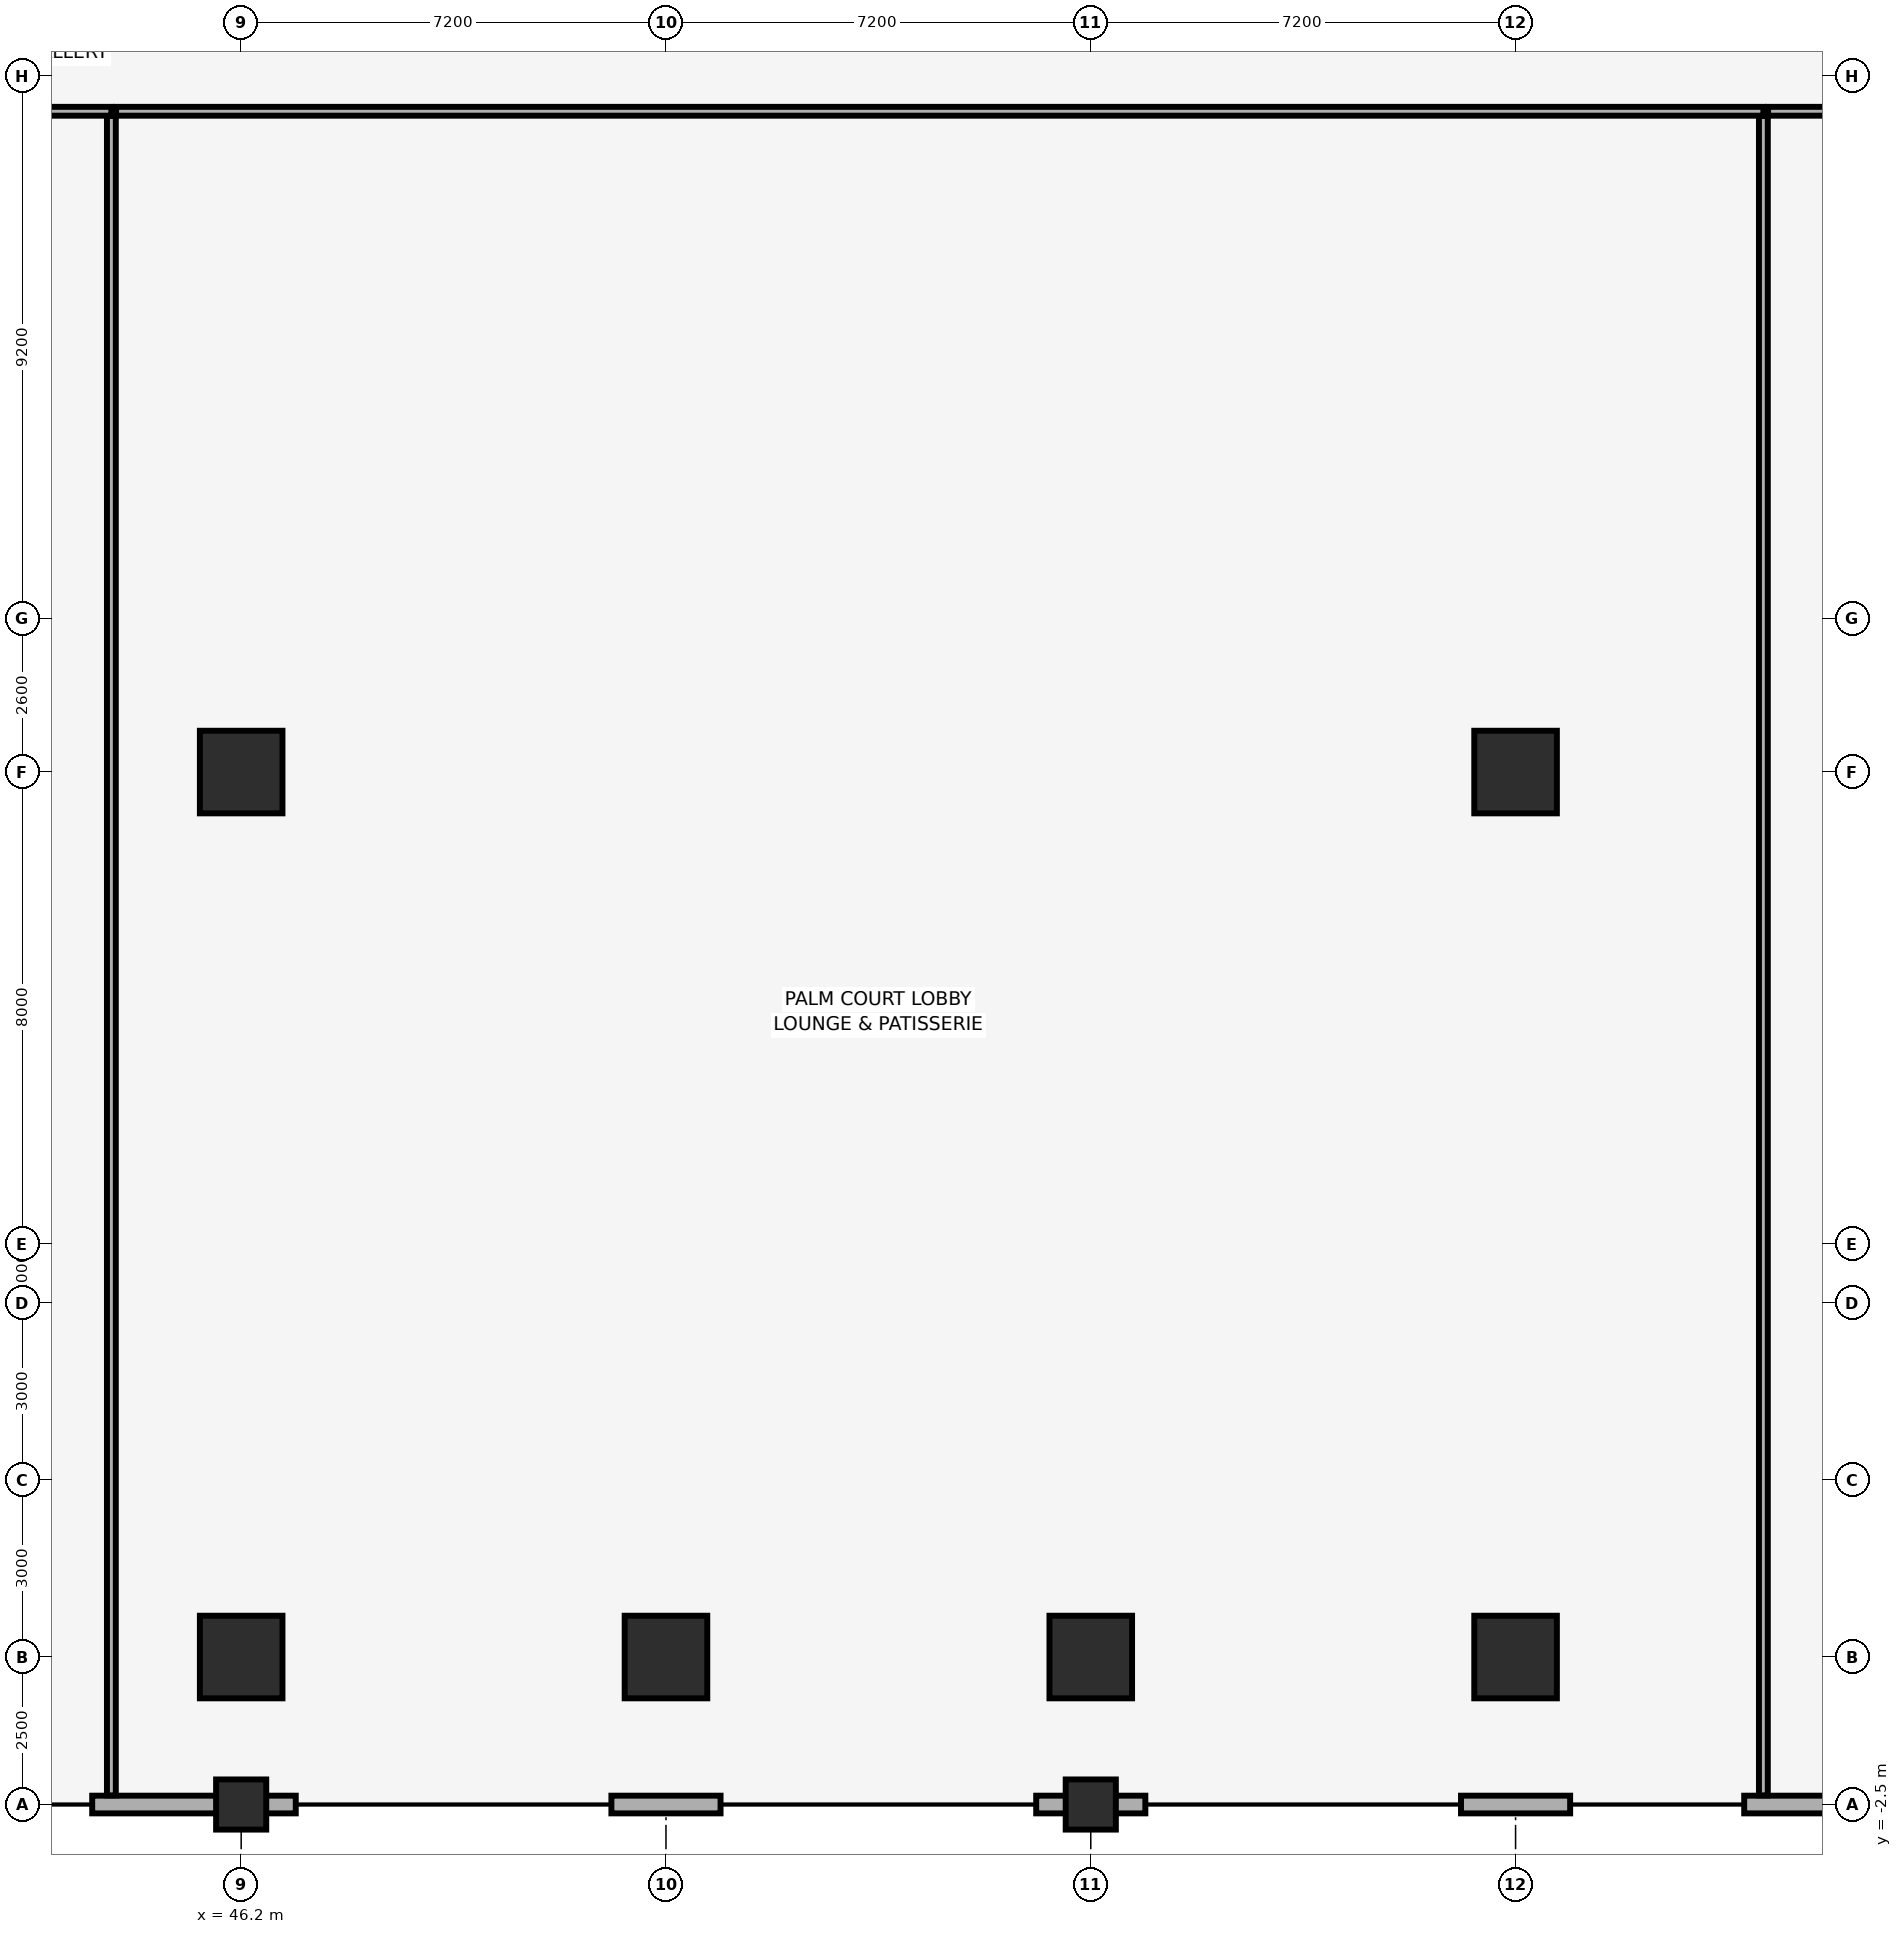
"""IFC4 building model, lengths in metres.
Left out: names, types, materials, properties, quantities, classifications, styles, units other than length and angle.
Written with IfcOpenShell. Run it as: python <this file> out.ifc"""

import sys

from ifc_helpers import new_model, si_unit, direction, frame, frame_2d, origin, origin_2d, place, context, subcontext, project, spatial, rectangle, extrude, element, fill, save


model = new_model("IFC4")
c1 = context("Model", 3, precision=1e-05, world=origin(), true_north=direction((0.0, 1.0)))
c2 = subcontext(c1, "Body", "Model", "MODEL_VIEW")
j1 = project(units=[si_unit("LENGTHUNIT", "METRE"), si_unit("PLANEANGLEUNIT", "RADIAN")], contexts=[c1])
p1 = place(None, origin())
s1 = spatial("IfcSite", under=j1, at=p1, CompositionType="ELEMENT")
p2 = place(p1, origin())
s2 = spatial("IfcBuilding", under=s1, at=p2, CompositionType="ELEMENT")
p3 = place(p2, frame((0.0, 0.0, 8.0)))
s3 = spatial("IfcBuildingStorey", under=s2, at=p3, CompositionType="ELEMENT", Elevation=8.0)
for number, where, z_axis, x_axis in (
    (1, (46.2, -2.5, 0.0), (0.0, 0.0, 1.0), (1.0, 0.0, 0.0)),
    (2, (60.6, -2.5, 0.0), (0.0, 0.0, 1.0), (1.0, 0.0, 0.0)),
):
    element("IfcColumn", number, at=place(p3, frame(where, z_axis=z_axis, x_axis=x_axis)), inside=s3, PredefinedType="COLUMN", context=c2, shape_type="SweptSolid", body=[
        extrude(rectangle(XDim=0.85, YDim=0.85, at=origin_2d()), origin(), (0.0, 0.0, 1.0), 5.68),
    ])
for number, where, z_axis, x_axis in (
    (3, (46.2, 0.0, 0.0), (0.0, 0.0, 1.0), (1.0, 0.0, 0.0)),
    (4, (53.4, 0.0, 0.0), (0.0, 0.0, 1.0), (1.0, 0.0, 0.0)),
    (5, (60.6, 0.0, 0.0), (0.0, 0.0, 1.0), (1.0, 0.0, 0.0)),
    (6, (67.8, 0.0, 0.0), (0.0, 0.0, 1.0), (1.0, 0.0, 0.0)),
    (7, (46.2, 15.0, 0.0), (0.0, 0.0, 1.0), (1.0, 0.0, 0.0)),
    (8, (67.8, 15.0, 0.0), (0.0, 0.0, 1.0), (1.0, 0.0, 0.0)),
):
    element("IfcColumn", number, at=place(p3, frame(where, z_axis=z_axis, x_axis=x_axis)), inside=s3, PredefinedType="COLUMN", context=c2, shape_type="SweptSolid", body=[
        extrude(rectangle(XDim=1.4, YDim=1.4, at=origin_2d()), origin(), (0.0, 0.0, 1.0), 5.68),
    ])
p4 = place(p3, frame((43.675, -2.5, 0.0), z_axis=(0.0, 0.0, 1.0), x_axis=(1.0, 0.0, 0.0)))
e9 = element("IfcWall", 9, at=p4, inside=s3, PredefinedType="SOLIDWALL", context=c2, shape_type="SweptSolid", body=[
    extrude(rectangle(XDim=3.45, YDim=0.3, at=frame_2d((1.725, 0.0))), origin(), (0.0, 0.0, 1.0), 4.73),
])
for number, where, z_axis, x_axis in (
    (10, (52.475, -2.5, 0.0), (0.0, 0.0, 1.0), (1.0, 0.0, 0.0)),
    (11, (59.675, -2.5, 0.0), (0.0, 0.0, 1.0), (1.0, 0.0, 0.0)),
):
    element("IfcWall", number, at=place(p3, frame(where, z_axis=z_axis, x_axis=x_axis)), inside=s3, PredefinedType="SOLIDWALL", context=c2, shape_type="SweptSolid", body=[
        extrude(rectangle(XDim=1.85, YDim=0.3, at=frame_2d((0.925, 0.0))), origin(), (0.0, 0.0, 1.0), 4.73),
    ])
p5 = place(p3, frame((66.875, -2.5, 0.0), z_axis=(0.0, 0.0, 1.0), x_axis=(1.0, 0.0, 0.0)))
e12 = element("IfcWall", 12, at=p5, inside=s3, PredefinedType="SOLIDWALL", context=c2, shape_type="SweptSolid", body=[
    extrude(rectangle(XDim=1.85, YDim=0.3, at=frame_2d((0.925, 0.0))), origin(), (0.0, 0.0, 1.0), 4.73),
])
p6 = place(p3, frame((71.675, -2.5, 0.0), z_axis=(0.0, 0.0, 1.0), x_axis=(1.0, 0.0, 0.0)))
e13 = element("IfcWall", 13, at=p6, inside=s3, PredefinedType="SOLIDWALL", context=c2, shape_type="SweptSolid", body=[
    extrude(rectangle(XDim=11.925, YDim=0.3, at=frame_2d((5.962, 0.0))), origin(), (0.0, 0.0, 1.0), 4.73),
])
p7 = place(p6, frame((5.05, 0.0, 0.85)))
e14 = element("IfcOpeningElement", 14, at=p7, cuts=e13, PredefinedType="OPENING", context=c2, shape_type="SweptSolid", body=[
    extrude(rectangle(XDim=5.4, YDim=2.4, at=frame_2d((2.7, 1.2))), frame((0.0, 0.16, 0.0), z_axis=(0.0, -1.0, 0.0), x_axis=(1.0, 0.0, 0.0)), (0.0, 0.0, 1.0), 0.32),
])
p8 = place(p3, frame((9.0, 26.2, 0.0), z_axis=(0.0, 0.0, 1.0), x_axis=(1.0, 0.0, 0.0)))
e15 = element("IfcWall", 15, at=p8, inside=s3, PredefinedType="PARTITIONING", context=c2, shape_type="SweptSolid", body=[
    extrude(rectangle(XDim=35.0, YDim=0.15, at=frame_2d((17.5, 0.0))), origin(), (0.0, 0.0, 1.0), 5.68),
])
p9 = place(p8, frame((17.25, 0.0, 0.0)))
e16 = element("IfcOpeningElement", 16, at=p9, cuts=e15, PredefinedType="OPENING", context=c2, shape_type="SweptSolid", body=[
    extrude(rectangle(XDim=1.5, YDim=2.25, at=frame_2d((0.75, 1.125))), frame((0.0, 0.085, 0.0), z_axis=(0.0, -1.0, 0.0), x_axis=(1.0, 0.0, 0.0)), (0.0, 0.0, 1.0), 0.17),
])
p10 = place(p3, frame((44.0, -2.345, 0.0), z_axis=(0.0, 0.0, 1.0), x_axis=(0.0, 1.0, 0.0)))
e17 = element("IfcWall", 17, at=p10, inside=s3, PredefinedType="PARTITIONING", context=c2, shape_type="SweptSolid", body=[
    extrude(rectangle(XDim=28.465, YDim=0.15, at=frame_2d((14.232, 0.0))), origin(), (0.0, 0.0, 1.0), 5.68),
])
p11 = place(p3, frame((44.08, 26.2, 0.0), z_axis=(0.0, 0.0, 1.0), x_axis=(1.0, 0.0, 0.0)))
e18 = element("IfcWall", 18, at=p11, inside=s3, PredefinedType="PARTITIONING", context=c2, shape_type="SweptSolid", body=[
    extrude(rectangle(XDim=27.92, YDim=0.15, at=frame_2d((13.96, 0.0))), origin(), (0.0, 0.0, 1.0), 5.68),
])
p12 = place(p11, frame((13.17, 0.0, 0.0)))
e19 = element("IfcOpeningElement", 19, at=p12, cuts=e18, PredefinedType="OPENING", context=c2, shape_type="SweptSolid", body=[
    extrude(rectangle(XDim=1.5, YDim=2.25, at=frame_2d((0.75, 1.125))), frame((0.0, 0.085, 0.0), z_axis=(0.0, -1.0, 0.0), x_axis=(1.0, 0.0, 0.0)), (0.0, 0.0, 1.0), 0.17),
])
p13 = place(p3, frame((72.0, -2.345, 0.0), z_axis=(0.0, 0.0, 1.0), x_axis=(0.0, 1.0, 0.0)))
e20 = element("IfcWall", 20, at=p13, inside=s3, PredefinedType="PARTITIONING", context=c2, shape_type="SweptSolid", body=[
    extrude(rectangle(XDim=28.465, YDim=0.15, at=frame_2d((14.232, 0.0))), origin(), (0.0, 0.0, 1.0), 5.68),
])
p14 = place(p3, frame((72.08, 26.2, 0.0), z_axis=(0.0, 0.0, 1.0), x_axis=(1.0, 0.0, 0.0)))
e21 = element("IfcWall", 21, at=p14, inside=s3, PredefinedType="PARTITIONING", context=c2, shape_type="SweptSolid", body=[
    extrude(rectangle(XDim=14.965, YDim=0.15, at=frame_2d((7.482, 0.0))), origin(), (0.0, 0.0, 1.0), 5.68),
])
p15 = place(p14, frame((7.17, 0.0, 0.0)))
e22 = element("IfcOpeningElement", 22, at=p15, cuts=e21, PredefinedType="OPENING", context=c2, shape_type="SweptSolid", body=[
    extrude(rectangle(XDim=1.5, YDim=2.25, at=frame_2d((0.75, 1.125))), frame((0.0, 0.085, 0.0), z_axis=(0.0, -1.0, 0.0), x_axis=(1.0, 0.0, 0.0)), (0.0, 0.0, 1.0), 0.17),
])
p16 = place(p12, origin())
e23 = element("IfcDoor", 23, at=p16, inside=s3, OperationType="DOUBLE_DOOR_SINGLE_SWING", PredefinedType="DOOR", context=c2, shape_type="SweptSolid", body=[
    extrude(rectangle(XDim=1.5, YDim=2.25, at=frame_2d((0.75, 1.125))), frame((0.0, 0.025, 0.0), z_axis=(0.0, -1.0, 0.0), x_axis=(1.0, 0.0, 0.0)), (0.0, 0.0, 1.0), 0.05),
])
fill(e19, e23)
save(model, sys.argv[1])
